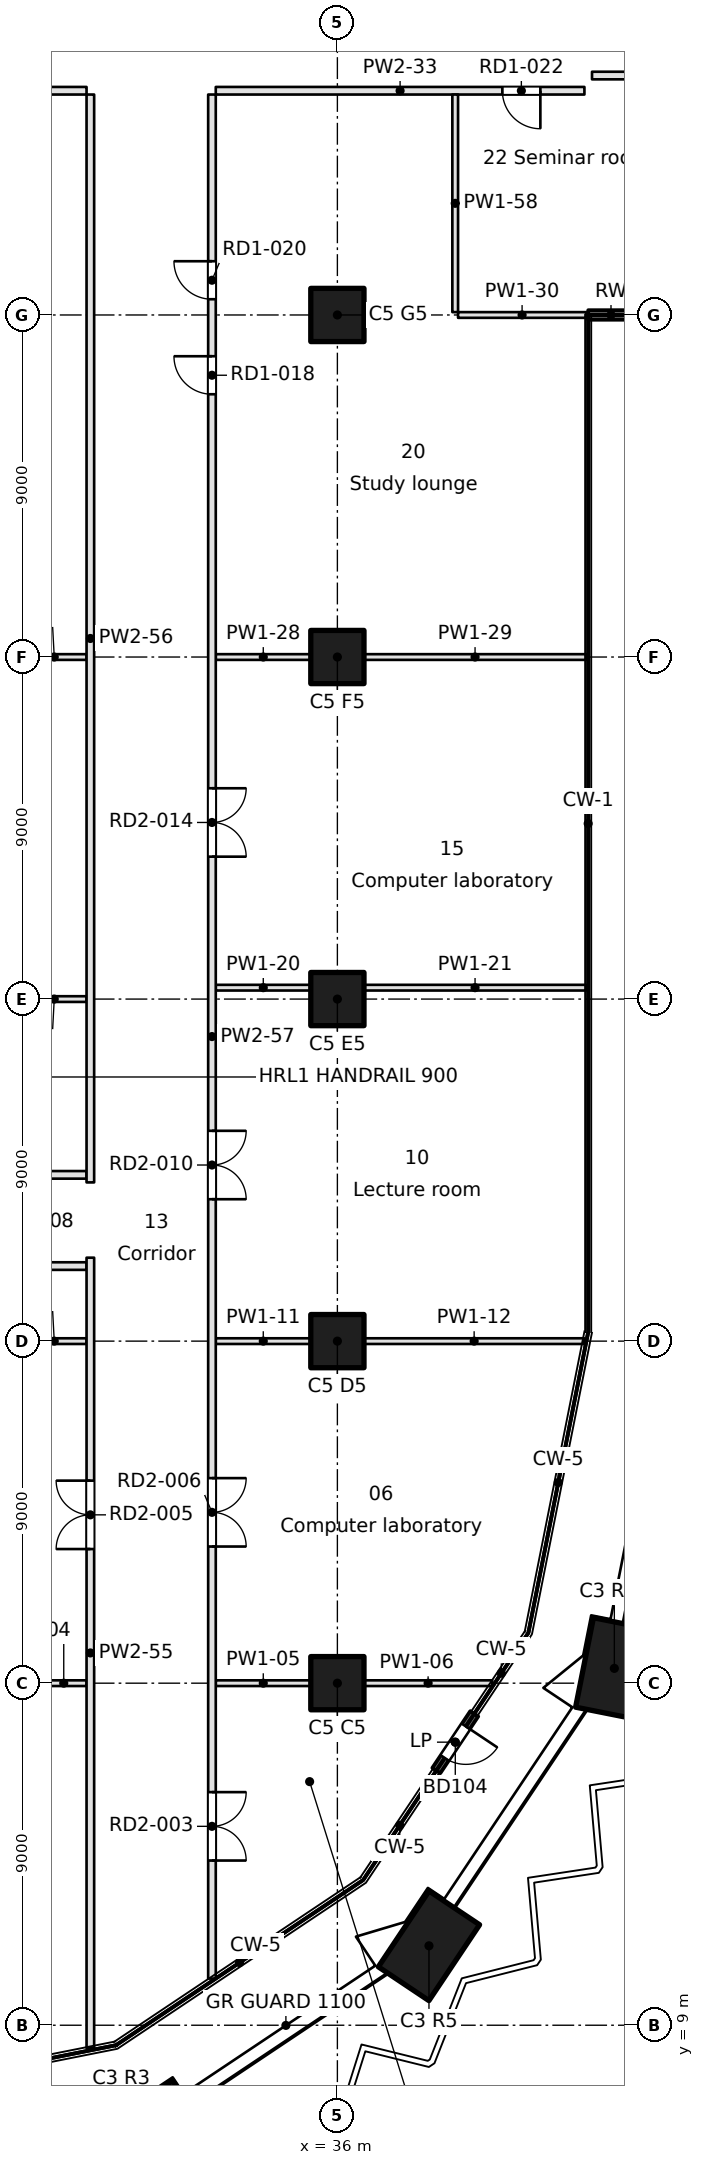
"""IFC4 building model, lengths in metres.
Left out: names, types, materials, properties, quantities, classifications, styles, units other than length and angle.
Written with IfcOpenShell. Run it as: python <this file> out.ifc"""

import sys

from ifc_helpers import new_model, si_unit, direction, frame, frame_2d, origin, origin_2d, place, context, subcontext, project, spatial, rectangle, extrude, element, fill, save


model = new_model("IFC4")
c1 = context("Model", 3, precision=1e-05, world=origin(), true_north=direction((0.0, 1.0)))
c2 = subcontext(c1, "Body", "Model", "MODEL_VIEW")
j1 = project(units=[si_unit("LENGTHUNIT", "METRE"), si_unit("PLANEANGLEUNIT", "RADIAN")], contexts=[c1])
p1 = place(None, origin())
s1 = spatial("IfcSite", under=j1, at=p1, CompositionType="ELEMENT")
p2 = place(p1, origin())
s2 = spatial("IfcBuilding", under=s1, at=p2, CompositionType="ELEMENT")
p3 = place(p2, frame((0.0, 0.0, 65.4)))
s3 = spatial("IfcBuildingStorey", under=s2, at=p3, CompositionType="ELEMENT", Elevation=65.4)
for number, where, z_axis, x_axis in (
    (1, (31.11, 6.213, 0.0), (0.0, 0.0, 1.0), (0.831, 0.556, 0.0)),
    (2, (38.41, 11.09, 0.0), (0.0, 0.0, 1.0), (0.556, 0.831, 0.0)),
    (3, (43.287, 18.39, 0.0), (0.0, 0.0, 1.0), (0.195, 0.981, 0.0)),
):
    element("IfcColumn", number, at=place(p3, frame(where, z_axis=z_axis, x_axis=x_axis)), inside=s3, PredefinedType="COLUMN", context=c2, shape_type="SweptSolid", body=[
        extrude(rectangle(XDim=2.4, YDim=1.6, at=origin_2d()), origin(), (0.0, 0.0, 1.0), 3.7),
    ])
for number, where, z_axis, x_axis in (
    (4, (36.0, 18.0, 0.0), (0.0, 0.0, 1.0), (1.0, 0.0, 0.0)),
    (5, (36.0, 27.0, 0.0), (0.0, 0.0, 1.0), (1.0, 0.0, 0.0)),
    (6, (36.0, 36.0, 0.0), (0.0, 0.0, 1.0), (1.0, 0.0, 0.0)),
    (7, (36.0, 45.0, 0.0), (0.0, 0.0, 1.0), (1.0, 0.0, 0.0)),
    (8, (36.0, 54.0, 0.0), (0.0, 0.0, 1.0), (1.0, 0.0, 0.0)),
):
    element("IfcColumn", number, at=place(p3, frame(where, z_axis=z_axis, x_axis=x_axis)), inside=s3, PredefinedType="COLUMN", context=c2, shape_type="SweptSolid", body=[
        extrude(rectangle(XDim=1.4, YDim=1.4, at=origin_2d()), origin(), (0.0, 0.0, 1.0), 3.7),
    ])
p4 = place(p3, frame((38.602, 15.7, 0.0), z_axis=(0.0, 0.0, 1.0), x_axis=(0.555576323502, 0.83146554274, 0.0)))
e9 = element("IfcWall", 9, at=p4, inside=s3, PredefinedType="SOLIDWALL", context=c2, shape_type="SweptSolid", body=[
    extrude(rectangle(XDim=1.8, YDim=0.25, at=frame_2d((0.9, 0.0))), origin(), (0.0, 0.0, 1.0), 3.3),
])
p5 = place(p4, frame((0.4, 0.0, 0.0)))
e10 = element("IfcOpeningElement", 10, at=p5, cuts=e9, PredefinedType="OPENING", context=c2, shape_type="SweptSolid", body=[
    extrude(rectangle(XDim=1.0, YDim=2.1, at=frame_2d((0.5, 1.05))), frame((0.0, 0.125, 0.0), z_axis=(0.0, -1.0, 0.0), x_axis=(1.0, 0.0, 0.0)), (0.0, 0.0, 1.0), 0.25),
])
p6 = place(p3, frame((42.599, 54.0, 0.0), z_axis=(0.0, 0.0, 1.0), x_axis=(0.999999917344, 0.000406586671, 0.0)))
e11 = element("IfcWall", 11, at=p6, inside=s3, PredefinedType="SOLIDWALL", context=c2, shape_type="SweptSolid", body=[
    extrude(rectangle(XDim=1.201, YDim=0.25, at=frame_2d((0.601, 0.0))), origin(), (0.0, 0.0, 1.0), 3.3),
])
p7 = place(p3, frame((28.2, 18.0, 0.0), z_axis=(0.0, 0.0, 1.0), x_axis=(1.0, 0.0, 0.0)))
e12 = element("IfcWall", 12, at=p7, inside=s3, PredefinedType="PARTITIONING", context=c2, shape_type="SweptSolid", body=[
    extrude(rectangle(XDim=1.2, YDim=0.15, at=frame_2d((0.6, 0.0))), origin(), (0.0, 0.0, 1.0), 3.3),
])
p8 = place(p3, frame((32.8, 18.0, 0.0), z_axis=(0.0, 0.0, 1.0), x_axis=(1.0, 0.0, 0.0)))
e13 = element("IfcWall", 13, at=p8, inside=s3, PredefinedType="PARTITIONING", context=c2, shape_type="SweptSolid", body=[
    extrude(rectangle(XDim=2.5, YDim=0.15, at=frame_2d((1.25, 0.0))), origin(), (0.0, 0.0, 1.0), 3.3),
])
p9 = place(p3, frame((36.7, 18.0, 0.0), z_axis=(0.0, 0.0, 1.0), x_axis=(1.0, 0.0, 0.0)))
e14 = element("IfcWall", 14, at=p9, inside=s3, PredefinedType="PARTITIONING", context=c2, shape_type="SweptSolid", body=[
    extrude(rectangle(XDim=3.375, YDim=0.15, at=frame_2d((1.687, 0.0))), origin(), (0.0, 0.0, 1.0), 3.3),
])
p10 = place(p3, frame((27.7, 27.0, 0.0), z_axis=(0.0, 0.0, 1.0), x_axis=(1.0, 0.0, 0.0)))
e15 = element("IfcWall", 15, at=p10, inside=s3, PredefinedType="PARTITIONING", context=c2, shape_type="SweptSolid", body=[
    extrude(rectangle(XDim=1.7, YDim=0.15, at=frame_2d((0.85, 0.0))), origin(), (0.0, 0.0, 1.0), 3.3),
])
p11 = place(p3, frame((32.8, 27.0, 0.0), z_axis=(0.0, 0.0, 1.0), x_axis=(1.0, 0.0, 0.0)))
e16 = element("IfcWall", 16, at=p11, inside=s3, PredefinedType="PARTITIONING", context=c2, shape_type="SweptSolid", body=[
    extrude(rectangle(XDim=2.5, YDim=0.15, at=frame_2d((1.25, 0.0))), origin(), (0.0, 0.0, 1.0), 3.3),
])
p12 = place(p3, frame((36.7, 27.0, 0.0), z_axis=(0.0, 0.0, 1.0), x_axis=(1.0, 0.0, 0.0)))
e17 = element("IfcWall", 17, at=p12, inside=s3, PredefinedType="PARTITIONING", context=c2, shape_type="SweptSolid", body=[
    extrude(rectangle(XDim=5.797, YDim=0.15, at=frame_2d((2.898, 0.0))), origin(), (0.0, 0.0, 1.0), 3.3),
])
p13 = place(p3, frame((29.4, 28.975, 0.0), z_axis=(0.0, 0.0, 1.0), x_axis=(-1.0, 0.0, 0.0)))
e18 = element("IfcWall", 18, at=p13, inside=s3, PredefinedType="PARTITIONING", context=c2, shape_type="SweptSolid", body=[
    extrude(rectangle(XDim=5.37, YDim=0.2, at=frame_2d((2.685, 0.0))), origin(), (0.0, 0.0, 1.0), 3.3),
])
p14 = place(p3, frame((24.104, 31.375, 0.0), z_axis=(0.0, 0.0, 1.0), x_axis=(1.0, 0.0, 0.0)))
e19 = element("IfcWall", 19, at=p14, inside=s3, PredefinedType="PARTITIONING", context=c2, shape_type="SweptSolid", body=[
    extrude(rectangle(XDim=5.296, YDim=0.2, at=frame_2d((2.648, 0.0))), origin(), (0.0, 0.0, 1.0), 3.3),
])
p15 = place(p14, frame((1.748, 0.0, 0.0)))
e20 = element("IfcOpeningElement", 20, at=p15, cuts=e19, PredefinedType="OPENING", context=c2, shape_type="SweptSolid", body=[
    extrude(rectangle(XDim=1.8, YDim=2.1, at=frame_2d((0.9, 1.05))), frame((0.0, 0.1, 0.0), z_axis=(0.0, -1.0, 0.0), x_axis=(1.0, 0.0, 0.0)), (0.0, 0.0, 1.0), 0.2),
])
p16 = place(p3, frame((27.7, 36.0, 0.0), z_axis=(0.0, 0.0, 1.0), x_axis=(1.0, 0.0, 0.0)))
e21 = element("IfcWall", 21, at=p16, inside=s3, PredefinedType="PARTITIONING", context=c2, shape_type="SweptSolid", body=[
    extrude(rectangle(XDim=1.7, YDim=0.15, at=frame_2d((0.85, 0.0))), origin(), (0.0, 0.0, 1.0), 3.3),
])
p17 = place(p3, frame((32.8, 36.3, 0.0), z_axis=(0.0, 0.0, 1.0), x_axis=(1.0, 0.0, 0.0)))
e22 = element("IfcWall", 22, at=p17, inside=s3, PredefinedType="PARTITIONING", context=c2, shape_type="SweptSolid", body=[
    extrude(rectangle(XDim=2.5, YDim=0.15, at=frame_2d((1.25, 0.0))), origin(), (0.0, 0.0, 1.0), 3.3),
])
p18 = place(p3, frame((36.7, 36.3, 0.0), z_axis=(0.0, 0.0, 1.0), x_axis=(1.0, 0.0, 0.0)))
e23 = element("IfcWall", 23, at=p18, inside=s3, PredefinedType="PARTITIONING", context=c2, shape_type="SweptSolid", body=[
    extrude(rectangle(XDim=5.845, YDim=0.15, at=frame_2d((2.922, 0.0))), origin(), (0.0, 0.0, 1.0), 3.3),
])
p19 = place(p3, frame((27.7, 45.0, 0.0), z_axis=(0.0, 0.0, 1.0), x_axis=(1.0, 0.0, 0.0)))
e24 = element("IfcWall", 24, at=p19, inside=s3, PredefinedType="PARTITIONING", context=c2, shape_type="SweptSolid", body=[
    extrude(rectangle(XDim=1.7, YDim=0.15, at=frame_2d((0.85, 0.0))), origin(), (0.0, 0.0, 1.0), 3.3),
])
p20 = place(p3, frame((32.8, 45.0, 0.0), z_axis=(0.0, 0.0, 1.0), x_axis=(1.0, 0.0, 0.0)))
e25 = element("IfcWall", 25, at=p20, inside=s3, PredefinedType="PARTITIONING", context=c2, shape_type="SweptSolid", body=[
    extrude(rectangle(XDim=2.5, YDim=0.15, at=frame_2d((1.25, 0.0))), origin(), (0.0, 0.0, 1.0), 3.3),
])
p21 = place(p3, frame((36.7, 45.0, 0.0), z_axis=(0.0, 0.0, 1.0), x_axis=(1.0, 0.0, 0.0)))
e26 = element("IfcWall", 26, at=p21, inside=s3, PredefinedType="PARTITIONING", context=c2, shape_type="SweptSolid", body=[
    extrude(rectangle(XDim=5.845, YDim=0.15, at=frame_2d((2.922, 0.0))), origin(), (0.0, 0.0, 1.0), 3.3),
])
p22 = place(p3, frame((39.175, 54.0, 0.0), z_axis=(0.0, 0.0, 1.0), x_axis=(1.0, 0.0, 0.0)))
e27 = element("IfcWall", 27, at=p22, inside=s3, PredefinedType="PARTITIONING", context=c2, shape_type="SweptSolid", body=[
    extrude(rectangle(XDim=3.37, YDim=0.15, at=frame_2d((1.685, 0.0))), origin(), (0.0, 0.0, 1.0), 3.3),
])
p23 = place(p3, frame((29.4, 59.9, 0.0), z_axis=(0.0, 0.0, 1.0), x_axis=(-1.0, 0.0, 0.0)))
e28 = element("IfcWall", 28, at=p23, inside=s3, PredefinedType="PARTITIONING", context=c2, shape_type="SweptSolid", body=[
    extrude(rectangle(XDim=12.072, YDim=0.2, at=frame_2d((6.036, 0.0))), origin(), (0.0, 0.0, 1.0), 3.3),
])
p24 = place(p3, frame((42.5, 59.9, 0.0), z_axis=(0.0, 0.0, 1.0), x_axis=(-1.0, 0.0, 0.0)))
e29 = element("IfcWall", 29, at=p24, inside=s3, PredefinedType="PARTITIONING", context=c2, shape_type="SweptSolid", body=[
    extrude(rectangle(XDim=9.7, YDim=0.2, at=frame_2d((4.85, 0.0))), origin(), (0.0, 0.0, 1.0), 3.3),
])
p25 = place(p24, frame((1.159, 0.0, 0.0)))
e30 = element("IfcOpeningElement", 30, at=p25, cuts=e29, PredefinedType="OPENING", context=c2, shape_type="SweptSolid", body=[
    extrude(rectangle(XDim=1.0, YDim=2.1, at=frame_2d((0.5, 1.05))), frame((0.0, 0.1, 0.0), z_axis=(0.0, -1.0, 0.0), x_axis=(1.0, 0.0, 0.0)), (0.0, 0.0, 1.0), 0.2),
])
p26 = place(p3, frame((94.354, 60.3, 0.0), z_axis=(0.0, 0.0, 1.0), x_axis=(-1.0, 0.0, 0.0)))
e31 = element("IfcWall", 31, at=p26, inside=s3, PredefinedType="PARTITIONING", context=c2, shape_type="SweptSolid", body=[
    extrude(rectangle(XDim=51.654, YDim=0.2, at=frame_2d((25.827, 0.0))), origin(), (0.0, 0.0, 1.0), 3.3),
])
p27 = place(p26, frame((44.247, 0.0, 0.0)))
e32 = element("IfcOpeningElement", 32, at=p27, cuts=e31, PredefinedType="OPENING", context=c2, shape_type="SweptSolid", body=[
    extrude(rectangle(XDim=1.0, YDim=2.1, at=frame_2d((0.5, 1.05))), frame((0.0, 0.1, 0.0), z_axis=(0.0, -1.0, 0.0), x_axis=(1.0, 0.0, 0.0)), (0.0, 0.0, 1.0), 0.2),
])
p28 = place(p26, frame((30.557, 0.0, 0.0)))
e33 = element("IfcOpeningElement", 33, at=p28, cuts=e31, PredefinedType="OPENING", context=c2, shape_type="SweptSolid", body=[
    extrude(rectangle(XDim=1.0, YDim=2.1, at=frame_2d((0.5, 1.05))), frame((0.0, 0.1, 0.0), z_axis=(0.0, -1.0, 0.0), x_axis=(1.0, 0.0, 0.0)), (0.0, 0.0, 1.0), 0.2),
])
p29 = place(p26, frame((17.118, 0.0, 0.0)))
e34 = element("IfcOpeningElement", 34, at=p29, cuts=e31, PredefinedType="OPENING", context=c2, shape_type="SweptSolid", body=[
    extrude(rectangle(XDim=1.0, YDim=2.1, at=frame_2d((0.5, 1.05))), frame((0.0, 0.1, 0.0), z_axis=(0.0, -1.0, 0.0), x_axis=(1.0, 0.0, 0.0)), (0.0, 0.0, 1.0), 0.2),
])
p30 = place(p26, frame((6.191, 0.0, 0.0)))
e35 = element("IfcOpeningElement", 35, at=p30, cuts=e31, PredefinedType="OPENING", context=c2, shape_type="SweptSolid", body=[
    extrude(rectangle(XDim=1.0, YDim=2.1, at=frame_2d((0.5, 1.05))), frame((0.0, 0.1, 0.0), z_axis=(0.0, -1.0, 0.0), x_axis=(1.0, 0.0, 0.0)), (0.0, 0.0, 1.0), 0.2),
])
p31 = place(p3, frame((29.5, 8.396, 0.0), z_axis=(0.0, 0.0, 1.0), x_axis=(0.0, 1.0, 0.0)))
e36 = element("IfcWall", 36, at=p31, inside=s3, PredefinedType="PARTITIONING", context=c2, shape_type="SweptSolid", body=[
    extrude(rectangle(XDim=20.8, YDim=0.2, at=frame_2d((10.4, 0.0))), origin(), (0.0, 0.0, 1.0), 3.3),
])
p32 = place(p31, frame((13.134, 0.0, 0.0)))
e37 = element("IfcOpeningElement", 37, at=p32, cuts=e36, PredefinedType="OPENING", context=c2, shape_type="SweptSolid", body=[
    extrude(rectangle(XDim=1.8, YDim=2.1, at=frame_2d((0.9, 1.05))), frame((0.0, 0.1, 0.0), z_axis=(0.0, -1.0, 0.0), x_axis=(1.0, 0.0, 0.0)), (0.0, 0.0, 1.0), 0.2),
])
p33 = place(p3, frame((29.5, 31.176, 0.0), z_axis=(0.0, 0.0, 1.0), x_axis=(0.0, 1.0, 0.0)))
e38 = element("IfcWall", 38, at=p33, inside=s3, PredefinedType="PARTITIONING", context=c2, shape_type="SweptSolid", body=[
    extrude(rectangle(XDim=28.624, YDim=0.2, at=frame_2d((14.312, 0.0))), origin(), (0.0, 0.0, 1.0), 3.3),
])
p34 = place(p3, frame((32.7, 59.8, 0.0), z_axis=(0.0, 0.0, 1.0), x_axis=(0.0, -1.0, 0.0)))
e39 = element("IfcWall", 39, at=p34, inside=s3, PredefinedType="PARTITIONING", context=c2, shape_type="SweptSolid", body=[
    extrude(rectangle(XDim=49.573, YDim=0.2, at=frame_2d((24.786, 0.0))), origin(), (0.0, 0.0, 1.0), 3.3),
])
p35 = place(p34, frame((44.667, 0.0, 0.0)))
e40 = element("IfcOpeningElement", 40, at=p35, cuts=e39, PredefinedType="OPENING", context=c2, shape_type="SweptSolid", body=[
    extrude(rectangle(XDim=1.8, YDim=2.1, at=frame_2d((0.9, 1.05))), frame((0.0, 0.1, 0.0), z_axis=(0.0, -1.0, 0.0), x_axis=(1.0, 0.0, 0.0)), (0.0, 0.0, 1.0), 0.2),
])
p36 = place(p34, frame((36.405, 0.0, 0.0)))
e41 = element("IfcOpeningElement", 41, at=p36, cuts=e39, PredefinedType="OPENING", context=c2, shape_type="SweptSolid", body=[
    extrude(rectangle(XDim=1.8, YDim=2.1, at=frame_2d((0.9, 1.05))), frame((0.0, 0.1, 0.0), z_axis=(0.0, -1.0, 0.0), x_axis=(1.0, 0.0, 0.0)), (0.0, 0.0, 1.0), 0.2),
])
p37 = place(p34, frame((27.266, 0.0, 0.0)))
e42 = element("IfcOpeningElement", 42, at=p37, cuts=e39, PredefinedType="OPENING", context=c2, shape_type="SweptSolid", body=[
    extrude(rectangle(XDim=1.8, YDim=2.1, at=frame_2d((0.9, 1.05))), frame((0.0, 0.1, 0.0), z_axis=(0.0, -1.0, 0.0), x_axis=(1.0, 0.0, 0.0)), (0.0, 0.0, 1.0), 0.2),
])
p38 = place(p34, frame((18.253, 0.0, 0.0)))
e43 = element("IfcOpeningElement", 43, at=p38, cuts=e39, PredefinedType="OPENING", context=c2, shape_type="SweptSolid", body=[
    extrude(rectangle(XDim=1.8, YDim=2.1, at=frame_2d((0.9, 1.05))), frame((0.0, 0.1, 0.0), z_axis=(0.0, -1.0, 0.0), x_axis=(1.0, 0.0, 0.0)), (0.0, 0.0, 1.0), 0.2),
])
p39 = place(p34, frame((6.886, 0.0, 0.0)))
e44 = element("IfcOpeningElement", 44, at=p39, cuts=e39, PredefinedType="OPENING", context=c2, shape_type="SweptSolid", body=[
    extrude(rectangle(XDim=1.0, YDim=2.1, at=frame_2d((0.5, 1.05))), frame((0.0, 0.1, 0.0), z_axis=(0.0, -1.0, 0.0), x_axis=(1.0, 0.0, 0.0)), (0.0, 0.0, 1.0), 0.2),
])
p40 = place(p34, frame((4.386, 0.0, 0.0)))
e45 = element("IfcOpeningElement", 45, at=p40, cuts=e39, PredefinedType="OPENING", context=c2, shape_type="SweptSolid", body=[
    extrude(rectangle(XDim=1.0, YDim=2.1, at=frame_2d((0.5, 1.05))), frame((0.0, 0.1, 0.0), z_axis=(0.0, -1.0, 0.0), x_axis=(1.0, 0.0, 0.0)), (0.0, 0.0, 1.0), 0.2),
])
p41 = place(p3, frame((39.1, 59.8, 0.0), z_axis=(0.0, 0.0, 1.0), x_axis=(0.0, -1.0, 0.0)))
e46 = element("IfcWall", 46, at=p41, inside=s3, PredefinedType="PARTITIONING", context=c2, shape_type="SweptSolid", body=[
    extrude(rectangle(XDim=5.725, YDim=0.15, at=frame_2d((2.863, 0.0))), origin(), (0.0, 0.0, 1.0), 3.3),
])
p42 = place(p5, frame((1.0, 0.0, 0.0), z_axis=(0.0, 0.0, 1.0), x_axis=(-1.0, 0.0, 0.0)))
e47 = element("IfcDoor", 47, at=p42, inside=s3, OperationType="SINGLE_SWING_LEFT", PredefinedType="DOOR", context=c2, shape_type="SweptSolid", body=[
    extrude(rectangle(XDim=1.0, YDim=2.1, at=frame_2d((0.5, 1.05))), frame((0.0, 0.025, 0.0), z_axis=(0.0, -1.0, 0.0), x_axis=(1.0, 0.0, 0.0)), (0.0, 0.0, 1.0), 0.05),
])
fill(e10, e47)
p43 = place(p35, origin())
e48 = element("IfcDoor", 48, at=p43, inside=s3, OperationType="DOUBLE_DOOR_SINGLE_SWING", PredefinedType="DOOR", context=c2, shape_type="SweptSolid", body=[
    extrude(rectangle(XDim=1.8, YDim=2.1, at=frame_2d((0.9, 1.05))), frame((0.0, 0.025, 0.0), z_axis=(0.0, -1.0, 0.0), x_axis=(1.0, 0.0, 0.0)), (0.0, 0.0, 1.0), 0.05),
])
fill(e40, e48)
p44 = place(p32, origin())
e49 = element("IfcDoor", 49, at=p44, inside=s3, OperationType="DOUBLE_DOOR_SINGLE_SWING", PredefinedType="DOOR", context=c2, shape_type="SweptSolid", body=[
    extrude(rectangle(XDim=1.8, YDim=2.1, at=frame_2d((0.9, 1.05))), frame((0.0, 0.025, 0.0), z_axis=(0.0, -1.0, 0.0), x_axis=(1.0, 0.0, 0.0)), (0.0, 0.0, 1.0), 0.05),
])
fill(e37, e49)
p45 = place(p36, origin())
e50 = element("IfcDoor", 50, at=p45, inside=s3, OperationType="DOUBLE_DOOR_SINGLE_SWING", PredefinedType="DOOR", context=c2, shape_type="SweptSolid", body=[
    extrude(rectangle(XDim=1.8, YDim=2.1, at=frame_2d((0.9, 1.05))), frame((0.0, 0.025, 0.0), z_axis=(0.0, -1.0, 0.0), x_axis=(1.0, 0.0, 0.0)), (0.0, 0.0, 1.0), 0.05),
])
fill(e41, e50)
p46 = place(p37, origin())
e51 = element("IfcDoor", 51, at=p46, inside=s3, OperationType="DOUBLE_DOOR_SINGLE_SWING", PredefinedType="DOOR", context=c2, shape_type="SweptSolid", body=[
    extrude(rectangle(XDim=1.8, YDim=2.1, at=frame_2d((0.9, 1.05))), frame((0.0, 0.025, 0.0), z_axis=(0.0, -1.0, 0.0), x_axis=(1.0, 0.0, 0.0)), (0.0, 0.0, 1.0), 0.05),
])
fill(e42, e51)
p47 = place(p38, origin())
e52 = element("IfcDoor", 52, at=p47, inside=s3, OperationType="DOUBLE_DOOR_SINGLE_SWING", PredefinedType="DOOR", context=c2, shape_type="SweptSolid", body=[
    extrude(rectangle(XDim=1.8, YDim=2.1, at=frame_2d((0.9, 1.05))), frame((0.0, 0.025, 0.0), z_axis=(0.0, -1.0, 0.0), x_axis=(1.0, 0.0, 0.0)), (0.0, 0.0, 1.0), 0.05),
])
fill(e43, e52)
p48 = place(p39, frame((1.0, 0.0, 0.0), z_axis=(0.0, 0.0, 1.0), x_axis=(-1.0, 0.0, 0.0)))
e53 = element("IfcDoor", 53, at=p48, inside=s3, OperationType="SINGLE_SWING_RIGHT", PredefinedType="DOOR", context=c2, shape_type="SweptSolid", body=[
    extrude(rectangle(XDim=1.0, YDim=2.1, at=frame_2d((0.5, 1.05))), frame((0.0, 0.025, 0.0), z_axis=(0.0, -1.0, 0.0), x_axis=(1.0, 0.0, 0.0)), (0.0, 0.0, 1.0), 0.05),
])
fill(e44, e53)
p49 = place(p40, frame((1.0, 0.0, 0.0), z_axis=(0.0, 0.0, 1.0), x_axis=(-1.0, 0.0, 0.0)))
e54 = element("IfcDoor", 54, at=p49, inside=s3, OperationType="SINGLE_SWING_RIGHT", PredefinedType="DOOR", context=c2, shape_type="SweptSolid", body=[
    extrude(rectangle(XDim=1.0, YDim=2.1, at=frame_2d((0.5, 1.05))), frame((0.0, 0.025, 0.0), z_axis=(0.0, -1.0, 0.0), x_axis=(1.0, 0.0, 0.0)), (0.0, 0.0, 1.0), 0.05),
])
fill(e45, e54)
p50 = place(p25, origin())
e55 = element("IfcDoor", 55, at=p50, inside=s3, OperationType="SINGLE_SWING_LEFT", PredefinedType="DOOR", context=c2, shape_type="SweptSolid", body=[
    extrude(rectangle(XDim=1.0, YDim=2.1, at=frame_2d((0.5, 1.05))), frame((0.0, 0.025, 0.0), z_axis=(0.0, -1.0, 0.0), x_axis=(1.0, 0.0, 0.0)), (0.0, 0.0, 1.0), 0.05),
])
fill(e30, e55)
save(model, sys.argv[1])
